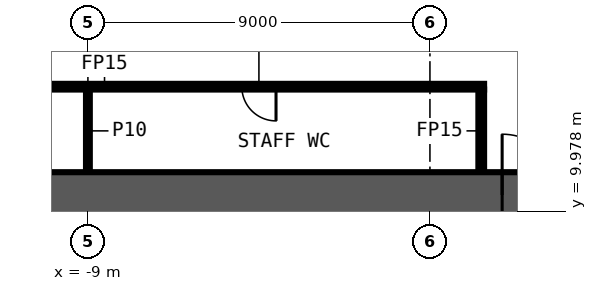
"""IFC4 building model, lengths in metres.
Left out: names, types, materials, properties, quantities, classifications, styles, units other than length and angle.
Written with IfcOpenShell. Run it as: python <this file> out.ifc"""

import sys

from ifc_helpers import new_model, si_unit, direction, frame, frame_2d, origin, place, context, subcontext, project, spatial, rectangle, extrude, element, fill, save


model = new_model("IFC4")
c1 = context("Model", 3, precision=1e-05, world=origin(), true_north=direction((0.0, 1.0)))
c2 = subcontext(c1, "Body", "Model", "MODEL_VIEW")
j1 = project(units=[si_unit("LENGTHUNIT", "METRE"), si_unit("PLANEANGLEUNIT", "RADIAN")], contexts=[c1])
p1 = place(None, origin())
s1 = spatial("IfcSite", under=j1, at=p1, CompositionType="ELEMENT")
p2 = place(p1, origin())
s2 = spatial("IfcBuilding", under=s1, at=p2, CompositionType="ELEMENT")
p3 = place(p2, frame((0.0, 0.0, 84.7)))
s3 = spatial("IfcBuildingStorey", under=s2, at=p3, CompositionType="ELEMENT", Elevation=84.7)
p4 = place(p3, frame((1.425, 13.25, 0.0), z_axis=(0.0, 0.0, 1.0), x_axis=(-1.0, 0.0, 0.0)))
e1 = element("IfcWall", 1, at=p4, inside=s3, PredefinedType="PARTITIONING", context=c2, shape_type="SweptSolid", body=[
    extrude(rectangle(XDim=17.75, YDim=0.15, at=frame_2d((8.875, 0.0))), origin(), (0.0, 0.0, 1.0), 3.9),
])
p5 = place(p4, frame((5.475, 0.0, 0.0)))
e2 = element("IfcOpeningElement", 2, at=p5, cuts=e1, PredefinedType="OPENING", context=c2, shape_type="SweptSolid", body=[
    extrude(rectangle(XDim=0.9, YDim=2.1, at=frame_2d((0.45, 1.05))), frame((0.0, 0.085, 0.0), z_axis=(0.0, -1.0, 0.0), x_axis=(1.0, 0.0, 0.0)), (0.0, 0.0, 1.0), 0.17),
])
p6 = place(p4, frame((13.6, 0.0, 0.0)))
e3 = element("IfcOpeningElement", 3, at=p6, cuts=e1, PredefinedType="OPENING", context=c2, shape_type="SweptSolid", body=[
    extrude(rectangle(XDim=0.9, YDim=2.1, at=frame_2d((0.45, 1.05))), frame((0.0, 0.085, 0.0), z_axis=(0.0, -1.0, 0.0), x_axis=(1.0, 0.0, 0.0)), (0.0, 0.0, 1.0), 0.17),
])
p7 = place(p3, frame((1.35, 11.0, 0.0), z_axis=(0.0, 0.0, 1.0), x_axis=(0.0, 1.0, 0.0)))
e4 = element("IfcWall", 4, at=p7, inside=s3, PredefinedType="PARTITIONING", context=c2, shape_type="SweptSolid", body=[
    extrude(rectangle(XDim=2.175, YDim=0.15, at=frame_2d((1.087, 0.0))), origin(), (0.0, 0.0, 1.0), 3.9),
])
p8 = place(p3, frame((-9.0, 11.0, 0.0), z_axis=(0.0, 0.0, 1.0), x_axis=(0.0, 1.0, 0.0)))
e5 = element("IfcWall", 5, at=p8, inside=s3, PredefinedType="PARTITIONING", context=c2, shape_type="SweptSolid", body=[
    extrude(rectangle(XDim=2.175, YDim=0.1, at=frame_2d((1.087, 0.0))), origin(), (0.0, 0.0, 1.0), 3.9),
])
p9 = place(p3, frame((-14.0, 10.4, 0.0), z_axis=(0.0, 0.0, 1.0), x_axis=(1.0, 0.0, 0.0)))
e6 = element("IfcWall", 6, at=p9, inside=s3, PredefinedType="SHEAR", context=c2, shape_type="SweptSolid", body=[
    extrude(rectangle(XDim=28.0, YDim=1.2, at=frame_2d((14.0, 0.0))), origin(), (0.0, 0.0, 1.0), 3.9),
])
p10 = place(p9, frame((15.9, 0.0, 0.0)))
e7 = element("IfcOpeningElement", 7, at=p10, cuts=e6, PredefinedType="OPENING", context=c2, shape_type="SweptSolid", body=[
    extrude(rectangle(XDim=1.6, YDim=2.1, at=frame_2d((0.8, 1.05))), frame((0.0, 0.61, 0.0), z_axis=(0.0, -1.0, 0.0), x_axis=(1.0, 0.0, 0.0)), (0.0, 0.0, 1.0), 1.22),
])
p11 = place(p5, origin())
e8 = element("IfcDoor", 8, at=p11, inside=s3, OperationType="SINGLE_SWING_LEFT", PredefinedType="DOOR", context=c2, shape_type="SweptSolid", body=[
    extrude(rectangle(XDim=0.9, YDim=2.1, at=frame_2d((0.45, 1.05))), frame((0.0, 0.025, 0.0), z_axis=(0.0, -1.0, 0.0), x_axis=(1.0, 0.0, 0.0)), (0.0, 0.0, 1.0), 0.05),
])
fill(e2, e8)
p12 = place(p10, origin())
e9 = element("IfcDoor", 9, at=p12, inside=s3, OperationType="DOUBLE_DOOR_SINGLE_SWING", PredefinedType="DOOR", context=c2, shape_type="SweptSolid", body=[
    extrude(rectangle(XDim=1.6, YDim=2.1, at=frame_2d((0.8, 1.05))), frame((0.0, 0.025, 0.0), z_axis=(0.0, -1.0, 0.0), x_axis=(1.0, 0.0, 0.0)), (0.0, 0.0, 1.0), 0.05),
])
fill(e7, e9)
save(model, sys.argv[1])
